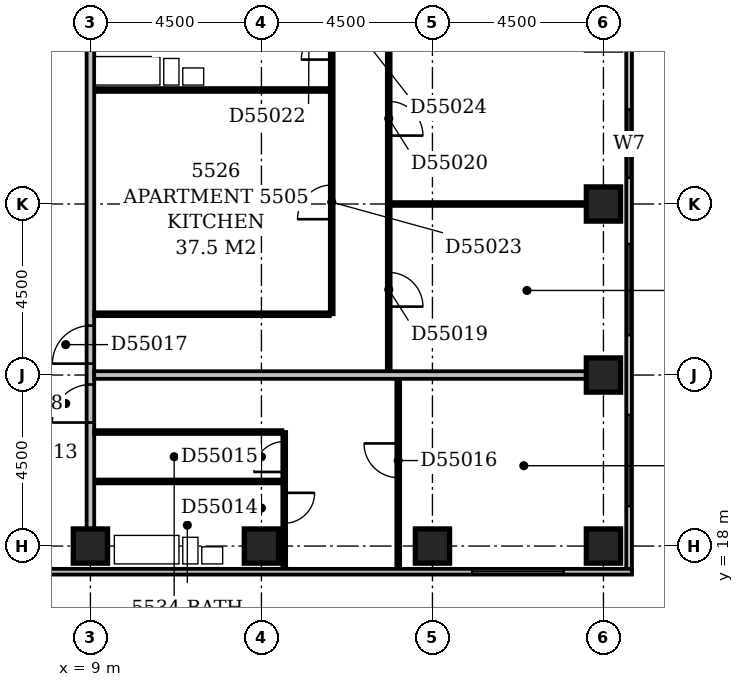
"""IFC4 building model, lengths in metres.
Left out: names, types, materials, properties, quantities, classifications, styles, units other than length and angle.
Written with IfcOpenShell. Run it as: python <this file> out.ifc"""

import sys

from ifc_helpers import new_model, si_unit, direction, frame, frame_2d, origin, origin_2d, place, context, subcontext, project, spatial, rectangle, extrude, element, fill, save


model = new_model("IFC4")
c1 = context("Model", 3, precision=1e-05, world=origin(), true_north=direction((0.0, 1.0)))
c2 = subcontext(c1, "Body", "Model", "MODEL_VIEW")
j1 = project(units=[si_unit("LENGTHUNIT", "METRE"), si_unit("PLANEANGLEUNIT", "RADIAN")], contexts=[c1])
p1 = place(None, origin())
s1 = spatial("IfcSite", under=j1, at=p1, CompositionType="ELEMENT")
p2 = place(p1, origin())
s2 = spatial("IfcBuilding", under=s1, at=p2, CompositionType="ELEMENT")
p3 = place(p2, frame((0.0, 0.0, 215.0)))
s3 = spatial("IfcBuildingStorey", under=s2, at=p3, CompositionType="ELEMENT", Elevation=215.0)
for number, where, z_axis, x_axis in (
    (1, (9.0, 18.0, -0.3), (0.0, 0.0, 1.0), (1.0, 0.0, 0.0)),
    (2, (13.5, 18.0, -0.3), (0.0, 0.0, 1.0), (1.0, 0.0, 0.0)),
    (3, (18.0, 18.0, -0.3), (0.0, 0.0, 1.0), (1.0, 0.0, 0.0)),
    (4, (22.5, 18.0, -0.3), (0.0, 0.0, 1.0), (1.0, 0.0, 0.0)),
    (5, (22.5, 22.5, -0.3), (0.0, 0.0, 1.0), (1.0, 0.0, 0.0)),
    (6, (22.5, 27.0, -0.3), (0.0, 0.0, 1.0), (1.0, 0.0, 0.0)),
):
    element("IfcColumn", number, at=place(p3, frame(where, z_axis=z_axis, x_axis=x_axis)), inside=s3, PredefinedType="COLUMN", context=c2, shape_type="SweptSolid", body=[
        extrude(rectangle(XDim=0.9, YDim=0.9, at=origin_2d()), origin(), (0.0, 0.0, 1.0), 3.6),
    ])
p4 = place(p3, frame((3.9, 17.325, 0.0), z_axis=(0.0, 0.0, 1.0), x_axis=(1.0, 0.0, 0.0)))
e7 = element("IfcWall", 7, at=p4, inside=s3, PredefinedType="STANDARD", context=c2, shape_type="SweptSolid", body=[
    extrude(rectangle(XDim=19.35, YDim=0.15, at=frame_2d((9.675, 0.0))), origin(), (0.0, 0.0, 1.0), 2.7),
])
p5 = place(p4, frame((15.15, 0.0, 0.6)))
e8 = element("IfcOpeningElement", 8, at=p5, cuts=e7, PredefinedType="OPENING", context=c2, shape_type="SweptSolid", body=[
    extrude(rectangle(XDim=2.4, YDim=1.8, at=frame_2d((1.2, 0.9))), frame((0.0, 0.087, 0.0), z_axis=(0.0, -1.0, 0.0), x_axis=(1.0, 0.0, 0.0)), (0.0, 0.0, 1.0), 0.174),
])
p6 = place(p3, frame((23.175, 17.4, 0.0), z_axis=(0.0, 0.0, 1.0), x_axis=(0.0, 1.0, 0.0)))
e9 = element("IfcWall", 9, at=p6, inside=s3, PredefinedType="STANDARD", context=c2, shape_type="SweptSolid", body=[
    extrude(rectangle(XDim=17.85, YDim=0.15, at=frame_2d((8.925, 0.0))), origin(), (0.0, 0.0, 1.0), 2.7),
])
p7 = place(p6, frame((1.65, 0.0, 0.6)))
e10 = element("IfcOpeningElement", 10, at=p7, cuts=e9, PredefinedType="OPENING", context=c2, shape_type="SweptSolid", body=[
    extrude(rectangle(XDim=2.4, YDim=1.8, at=frame_2d((1.2, 0.9))), frame((0.0, 0.087, 0.0), z_axis=(0.0, -1.0, 0.0), x_axis=(1.0, 0.0, 0.0)), (0.0, 0.0, 1.0), 0.174),
])
p8 = place(p6, frame((6.15, 0.0, 0.6)))
e11 = element("IfcOpeningElement", 11, at=p8, cuts=e9, PredefinedType="OPENING", context=c2, shape_type="SweptSolid", body=[
    extrude(rectangle(XDim=2.4, YDim=1.8, at=frame_2d((1.2, 0.9))), frame((0.0, 0.087, 0.0), z_axis=(0.0, -1.0, 0.0), x_axis=(1.0, 0.0, 0.0)), (0.0, 0.0, 1.0), 0.174),
])
p9 = place(p6, frame((10.288, 0.0, 0.6)))
e12 = element("IfcOpeningElement", 12, at=p9, cuts=e9, PredefinedType="OPENING", context=c2, shape_type="SweptSolid", body=[
    extrude(rectangle(XDim=1.8, YDim=1.8, at=frame_2d((0.9, 0.9))), frame((0.0, 0.087, 0.0), z_axis=(0.0, -1.0, 0.0), x_axis=(1.0, 0.0, 0.0)), (0.0, 0.0, 1.0), 0.174),
])
p10 = place(p6, frame((15.15, 0.0, 0.6)))
e13 = element("IfcOpeningElement", 13, at=p10, cuts=e9, PredefinedType="OPENING", context=c2, shape_type="SweptSolid", body=[
    extrude(rectangle(XDim=2.4, YDim=1.8, at=frame_2d((1.2, 0.9))), frame((0.0, 0.087, 0.0), z_axis=(0.0, -1.0, 0.0), x_axis=(1.0, 0.0, 0.0)), (0.0, 0.0, 1.0), 0.174),
])
p11 = place(p3, frame((14.1, 17.4, 0.0), z_axis=(0.0, 0.0, 1.0), x_axis=(0.0, 1.0, 0.0)))
e14 = element("IfcWall", 14, at=p11, inside=s3, PredefinedType="PARTITIONING", context=c2, shape_type="SweptSolid", body=[
    extrude(rectangle(XDim=3.6, YDim=0.1, at=frame_2d((1.8, 0.0))), origin(), (0.0, 0.0, 1.0), 3.3),
])
p12 = place(p11, frame((1.2, 0.0, 0.0)))
e15 = element("IfcOpeningElement", 15, at=p12, cuts=e14, PredefinedType="OPENING", context=c2, shape_type="SweptSolid", body=[
    extrude(rectangle(XDim=0.8, YDim=2.1, at=frame_2d((0.4, 1.05))), frame((0.0, 0.062, 0.0), z_axis=(0.0, -1.0, 0.0), x_axis=(1.0, 0.0, 0.0)), (0.0, 0.0, 1.0), 0.124),
])
p13 = place(p11, frame((2.55, 0.0, 0.0)))
e16 = element("IfcOpeningElement", 16, at=p13, cuts=e14, PredefinedType="OPENING", context=c2, shape_type="SweptSolid", body=[
    extrude(rectangle(XDim=0.8, YDim=2.1, at=frame_2d((0.4, 1.05))), frame((0.0, 0.062, 0.0), z_axis=(0.0, -1.0, 0.0), x_axis=(1.0, 0.0, 0.0)), (0.0, 0.0, 1.0), 0.124),
])
p14 = place(p3, frame((17.1, 17.4, 0.0), z_axis=(0.0, 0.0, 1.0), x_axis=(0.0, 1.0, 0.0)))
e17 = element("IfcWall", 17, at=p14, inside=s3, PredefinedType="PARTITIONING", context=c2, shape_type="SweptSolid", body=[
    extrude(rectangle(XDim=5.0, YDim=0.1, at=frame_2d((2.5, 0.0))), origin(), (0.0, 0.0, 1.0), 3.3),
])
p15 = place(p14, frame((2.4, 0.0, 0.0)))
e18 = element("IfcOpeningElement", 18, at=p15, cuts=e17, PredefinedType="OPENING", context=c2, shape_type="SweptSolid", body=[
    extrude(rectangle(XDim=0.9, YDim=2.1, at=frame_2d((0.45, 1.05))), frame((0.0, 0.062, 0.0), z_axis=(0.0, -1.0, 0.0), x_axis=(1.0, 0.0, 0.0)), (0.0, 0.0, 1.0), 0.124),
])
p16 = place(p3, frame((9.0, 18.45, 0.0), z_axis=(0.0, 0.0, 1.0), x_axis=(0.0, 1.0, 0.0)))
e19 = element("IfcWall", 19, at=p16, inside=s3, PredefinedType="PARTITIONING", context=c2, shape_type="SweptSolid", body=[
    extrude(rectangle(XDim=17.55, YDim=0.2, at=frame_2d((8.775, 0.0))), origin(), (0.0, 0.0, 1.0), 3.3),
])
p17 = place(p16, frame((4.35, 0.0, 0.0)))
e20 = element("IfcOpeningElement", 20, at=p17, cuts=e19, PredefinedType="OPENING", context=c2, shape_type="SweptSolid", body=[
    extrude(rectangle(XDim=1.0, YDim=2.1, at=frame_2d((0.5, 1.05))), frame((0.0, 0.112, 0.0), z_axis=(0.0, -1.0, 0.0), x_axis=(1.0, 0.0, 0.0)), (0.0, 0.0, 1.0), 0.224),
])
p18 = place(p16, frame((2.8, 0.0, 0.0)))
e21 = element("IfcOpeningElement", 21, at=p18, cuts=e19, PredefinedType="OPENING", context=c2, shape_type="SweptSolid", body=[
    extrude(rectangle(XDim=1.0, YDim=2.1, at=frame_2d((0.5, 1.05))), frame((0.0, 0.112, 0.0), z_axis=(0.0, -1.0, 0.0), x_axis=(1.0, 0.0, 0.0)), (0.0, 0.0, 1.0), 0.224),
])
p19 = place(p3, frame((9.1, 19.7, 0.0), z_axis=(0.0, 0.0, 1.0), x_axis=(1.0, 0.0, 0.0)))
e22 = element("IfcWall", 22, at=p19, inside=s3, PredefinedType="PLUMBINGWALL", context=c2, shape_type="SweptSolid", body=[
    extrude(rectangle(XDim=4.95, YDim=0.1, at=frame_2d((2.475, 0.0))), origin(), (0.0, 0.0, 1.0), 3.3),
])
p20 = place(p3, frame((9.1, 21.0, 0.0), z_axis=(0.0, 0.0, 1.0), x_axis=(1.0, 0.0, 0.0)))
e23 = element("IfcWall", 23, at=p20, inside=s3, PredefinedType="PARTITIONING", context=c2, shape_type="SweptSolid", body=[
    extrude(rectangle(XDim=4.95, YDim=0.1, at=frame_2d((2.475, 0.0))), origin(), (0.0, 0.0, 1.0), 3.3),
])
p21 = place(p3, frame((9.1, 22.5, 0.0), z_axis=(0.0, 0.0, 1.0), x_axis=(1.0, 0.0, 0.0)))
e24 = element("IfcWall", 24, at=p21, inside=s3, PredefinedType="PARTITIONING", context=c2, shape_type="SweptSolid", body=[
    extrude(rectangle(XDim=12.95, YDim=0.2, at=frame_2d((6.475, 0.0))), origin(), (0.0, 0.0, 1.0), 3.3),
])
p22 = place(p3, frame((16.85, 22.6, 0.0), z_axis=(0.0, 0.0, 1.0), x_axis=(0.0, 1.0, 0.0)))
e25 = element("IfcWall", 25, at=p22, inside=s3, PredefinedType="PARTITIONING", context=c2, shape_type="SweptSolid", body=[
    extrude(rectangle(XDim=13.3, YDim=0.1, at=frame_2d((6.65, 0.0))), origin(), (0.0, 0.0, 1.0), 3.3),
])
p23 = place(p22, frame((1.7, 0.0, 0.0)))
e26 = element("IfcOpeningElement", 26, at=p23, cuts=e25, PredefinedType="OPENING", context=c2, shape_type="SweptSolid", body=[
    extrude(rectangle(XDim=0.9, YDim=2.1, at=frame_2d((0.45, 1.05))), frame((0.0, 0.062, 0.0), z_axis=(0.0, -1.0, 0.0), x_axis=(1.0, 0.0, 0.0)), (0.0, 0.0, 1.0), 0.124),
])
p24 = place(p22, frame((6.2, 0.0, 0.0)))
e27 = element("IfcOpeningElement", 27, at=p24, cuts=e25, PredefinedType="OPENING", context=c2, shape_type="SweptSolid", body=[
    extrude(rectangle(XDim=0.9, YDim=2.1, at=frame_2d((0.45, 1.05))), frame((0.0, 0.062, 0.0), z_axis=(0.0, -1.0, 0.0), x_axis=(1.0, 0.0, 0.0)), (0.0, 0.0, 1.0), 0.124),
])
p25 = place(p22, frame((10.7, 0.0, 0.0)))
e28 = element("IfcOpeningElement", 28, at=p25, cuts=e25, PredefinedType="OPENING", context=c2, shape_type="SweptSolid", body=[
    extrude(rectangle(XDim=0.9, YDim=2.1, at=frame_2d((0.45, 1.05))), frame((0.0, 0.062, 0.0), z_axis=(0.0, -1.0, 0.0), x_axis=(1.0, 0.0, 0.0)), (0.0, 0.0, 1.0), 0.124),
])
p26 = place(p3, frame((9.1, 24.1, 0.0), z_axis=(0.0, 0.0, 1.0), x_axis=(1.0, 0.0, 0.0)))
e29 = element("IfcWall", 29, at=p26, inside=s3, PredefinedType="PARTITIONING", context=c2, shape_type="SweptSolid", body=[
    extrude(rectangle(XDim=6.2, YDim=0.1, at=frame_2d((3.1, 0.0))), origin(), (0.0, 0.0, 1.0), 3.3),
])
p27 = place(p3, frame((15.35, 24.1, 0.0), z_axis=(0.0, 0.0, 1.0), x_axis=(0.0, 1.0, 0.0)))
e30 = element("IfcWall", 30, at=p27, inside=s3, PredefinedType="PARTITIONING", context=c2, shape_type="SweptSolid", body=[
    extrude(rectangle(XDim=11.8, YDim=0.1, at=frame_2d((5.9, 0.0))), origin(), (0.0, 0.0, 1.0), 3.3),
])
p28 = place(p27, frame((6.7, 0.0, 0.0)))
e31 = element("IfcOpeningElement", 31, at=p28, cuts=e30, PredefinedType="OPENING", context=c2, shape_type="SweptSolid", body=[
    extrude(rectangle(XDim=0.8, YDim=2.1, at=frame_2d((0.4, 1.05))), frame((0.0, 0.062, 0.0), z_axis=(0.0, -1.0, 0.0), x_axis=(1.0, 0.0, 0.0)), (0.0, 0.0, 1.0), 0.124),
])
p29 = place(p27, frame((2.5, 0.0, 0.0)))
e32 = element("IfcOpeningElement", 32, at=p29, cuts=e30, PredefinedType="OPENING", context=c2, shape_type="SweptSolid", body=[
    extrude(rectangle(XDim=0.9, YDim=2.1, at=frame_2d((0.45, 1.05))), frame((0.0, 0.062, 0.0), z_axis=(0.0, -1.0, 0.0), x_axis=(1.0, 0.0, 0.0)), (0.0, 0.0, 1.0), 0.124),
])
p30 = place(p27, frame((8.7, 0.0, 0.0)))
e33 = element("IfcOpeningElement", 33, at=p30, cuts=e30, PredefinedType="OPENING", context=c2, shape_type="SweptSolid", body=[
    extrude(rectangle(XDim=0.8, YDim=2.1, at=frame_2d((0.4, 1.05))), frame((0.0, 0.062, 0.0), z_axis=(0.0, -1.0, 0.0), x_axis=(1.0, 0.0, 0.0)), (0.0, 0.0, 1.0), 0.124),
])
p31 = place(p27, frame((10.5, 0.0, 0.0)))
e34 = element("IfcOpeningElement", 34, at=p31, cuts=e30, PredefinedType="OPENING", context=c2, shape_type="SweptSolid", body=[
    extrude(rectangle(XDim=0.8, YDim=2.1, at=frame_2d((0.4, 1.05))), frame((0.0, 0.062, 0.0), z_axis=(0.0, -1.0, 0.0), x_axis=(1.0, 0.0, 0.0)), (0.0, 0.0, 1.0), 0.124),
])
p32 = place(p3, frame((16.9, 27.0, 0.0), z_axis=(0.0, 0.0, 1.0), x_axis=(1.0, 0.0, 0.0)))
e35 = element("IfcWall", 35, at=p32, inside=s3, PredefinedType="PARTITIONING", context=c2, shape_type="SweptSolid", body=[
    extrude(rectangle(XDim=5.15, YDim=0.1, at=frame_2d((2.575, 0.0))), origin(), (0.0, 0.0, 1.0), 2.7),
])
p33 = place(p3, frame((9.1, 30.0, 0.0), z_axis=(0.0, 0.0, 1.0), x_axis=(1.0, 0.0, 0.0)))
e36 = element("IfcWall", 36, at=p33, inside=s3, PredefinedType="PLUMBINGWALL", context=c2, shape_type="SweptSolid", body=[
    extrude(rectangle(XDim=6.2, YDim=0.1, at=frame_2d((3.1, 0.0))), origin(), (0.0, 0.0, 1.0), 3.3),
])
p34 = place(p5, origin())
e37 = element("IfcWindow", 37, at=p34, inside=s3, PartitioningType="SINGLE_PANEL", PredefinedType="WINDOW", context=c2, shape_type="SweptSolid", body=[
    extrude(rectangle(XDim=2.4, YDim=1.8, at=frame_2d((1.2, 0.9))), frame((0.0, 0.03, 0.0), z_axis=(0.0, -1.0, 0.0), x_axis=(1.0, 0.0, 0.0)), (0.0, 0.0, 1.0), 0.06),
])
fill(e8, e37)
p35 = place(p7, origin())
e38 = element("IfcWindow", 38, at=p35, inside=s3, PartitioningType="SINGLE_PANEL", PredefinedType="WINDOW", context=c2, shape_type="SweptSolid", body=[
    extrude(rectangle(XDim=2.4, YDim=1.8, at=frame_2d((1.2, 0.9))), frame((0.0, 0.03, 0.0), z_axis=(0.0, -1.0, 0.0), x_axis=(1.0, 0.0, 0.0)), (0.0, 0.0, 1.0), 0.06),
])
fill(e10, e38)
p36 = place(p8, origin())
e39 = element("IfcWindow", 39, at=p36, inside=s3, PartitioningType="SINGLE_PANEL", PredefinedType="WINDOW", context=c2, shape_type="SweptSolid", body=[
    extrude(rectangle(XDim=2.4, YDim=1.8, at=frame_2d((1.2, 0.9))), frame((0.0, 0.03, 0.0), z_axis=(0.0, -1.0, 0.0), x_axis=(1.0, 0.0, 0.0)), (0.0, 0.0, 1.0), 0.06),
])
fill(e11, e39)
p37 = place(p9, origin())
e40 = element("IfcWindow", 40, at=p37, inside=s3, PartitioningType="SINGLE_PANEL", PredefinedType="WINDOW", context=c2, shape_type="SweptSolid", body=[
    extrude(rectangle(XDim=1.8, YDim=1.8, at=frame_2d((0.9, 0.9))), frame((0.0, 0.03, 0.0), z_axis=(0.0, -1.0, 0.0), x_axis=(1.0, 0.0, 0.0)), (0.0, 0.0, 1.0), 0.06),
])
fill(e12, e40)
p38 = place(p12, origin())
e41 = element("IfcDoor", 41, at=p38, inside=s3, OperationType="SINGLE_SWING_RIGHT", PredefinedType="DOOR", context=c2, shape_type="SweptSolid", body=[
    extrude(rectangle(XDim=0.8, YDim=2.1, at=frame_2d((0.4, 1.05))), frame((0.0, 0.025, 0.0), z_axis=(0.0, -1.0, 0.0), x_axis=(1.0, 0.0, 0.0)), (0.0, 0.0, 1.0), 0.05),
])
fill(e15, e41)
p39 = place(p13, origin())
e42 = element("IfcDoor", 42, at=p39, inside=s3, OperationType="SINGLE_SWING_LEFT", PredefinedType="DOOR", context=c2, shape_type="SweptSolid", body=[
    extrude(rectangle(XDim=0.8, YDim=2.1, at=frame_2d((0.4, 1.05))), frame((0.0, 0.025, 0.0), z_axis=(0.0, -1.0, 0.0), x_axis=(1.0, 0.0, 0.0)), (0.0, 0.0, 1.0), 0.05),
])
fill(e16, e42)
p40 = place(p15, frame((0.9, 0.0, 0.0), z_axis=(0.0, 0.0, 1.0), x_axis=(-1.0, 0.0, 0.0)))
e43 = element("IfcDoor", 43, at=p40, inside=s3, OperationType="SINGLE_SWING_LEFT", PredefinedType="DOOR", context=c2, shape_type="SweptSolid", body=[
    extrude(rectangle(XDim=0.9, YDim=2.1, at=frame_2d((0.45, 1.05))), frame((0.0, 0.025, 0.0), z_axis=(0.0, -1.0, 0.0), x_axis=(1.0, 0.0, 0.0)), (0.0, 0.0, 1.0), 0.05),
])
fill(e18, e43)
p41 = place(p17, origin())
e44 = element("IfcDoor", 44, at=p41, inside=s3, OperationType="SINGLE_SWING_LEFT", PredefinedType="DOOR", context=c2, shape_type="SweptSolid", body=[
    extrude(rectangle(XDim=1.0, YDim=2.1, at=frame_2d((0.5, 1.05))), frame((0.0, 0.025, 0.0), z_axis=(0.0, -1.0, 0.0), x_axis=(1.0, 0.0, 0.0)), (0.0, 0.0, 1.0), 0.05),
])
fill(e20, e44)
p42 = place(p18, origin())
e45 = element("IfcDoor", 45, at=p42, inside=s3, OperationType="SINGLE_SWING_LEFT", PredefinedType="DOOR", context=c2, shape_type="SweptSolid", body=[
    extrude(rectangle(XDim=1.0, YDim=2.1, at=frame_2d((0.5, 1.05))), frame((0.0, 0.025, 0.0), z_axis=(0.0, -1.0, 0.0), x_axis=(1.0, 0.0, 0.0)), (0.0, 0.0, 1.0), 0.05),
])
fill(e21, e45)
p43 = place(p23, frame((0.9, 0.0, 0.0), z_axis=(0.0, 0.0, 1.0), x_axis=(-1.0, 0.0, 0.0)))
e46 = element("IfcDoor", 46, at=p43, inside=s3, OperationType="SINGLE_SWING_RIGHT", PredefinedType="DOOR", context=c2, shape_type="SweptSolid", body=[
    extrude(rectangle(XDim=0.9, YDim=2.1, at=frame_2d((0.45, 1.05))), frame((0.0, 0.025, 0.0), z_axis=(0.0, -1.0, 0.0), x_axis=(1.0, 0.0, 0.0)), (0.0, 0.0, 1.0), 0.05),
])
fill(e26, e46)
p44 = place(p24, frame((0.9, 0.0, 0.0), z_axis=(0.0, 0.0, 1.0), x_axis=(-1.0, 0.0, 0.0)))
e47 = element("IfcDoor", 47, at=p44, inside=s3, OperationType="SINGLE_SWING_RIGHT", PredefinedType="DOOR", context=c2, shape_type="SweptSolid", body=[
    extrude(rectangle(XDim=0.9, YDim=2.1, at=frame_2d((0.45, 1.05))), frame((0.0, 0.025, 0.0), z_axis=(0.0, -1.0, 0.0), x_axis=(1.0, 0.0, 0.0)), (0.0, 0.0, 1.0), 0.05),
])
fill(e27, e47)
p45 = place(p28, origin())
e48 = element("IfcDoor", 48, at=p45, inside=s3, OperationType="SINGLE_SWING_LEFT", PredefinedType="DOOR", context=c2, shape_type="SweptSolid", body=[
    extrude(rectangle(XDim=0.8, YDim=2.1, at=frame_2d((0.4, 1.05))), frame((0.0, 0.025, 0.0), z_axis=(0.0, -1.0, 0.0), x_axis=(1.0, 0.0, 0.0)), (0.0, 0.0, 1.0), 0.05),
])
fill(e31, e48)
p46 = place(p29, origin())
e49 = element("IfcDoor", 49, at=p46, inside=s3, OperationType="SINGLE_SWING_LEFT", PredefinedType="DOOR", context=c2, shape_type="SweptSolid", body=[
    extrude(rectangle(XDim=0.9, YDim=2.1, at=frame_2d((0.45, 1.05))), frame((0.0, 0.025, 0.0), z_axis=(0.0, -1.0, 0.0), x_axis=(1.0, 0.0, 0.0)), (0.0, 0.0, 1.0), 0.05),
])
fill(e32, e49)
save(model, sys.argv[1])
